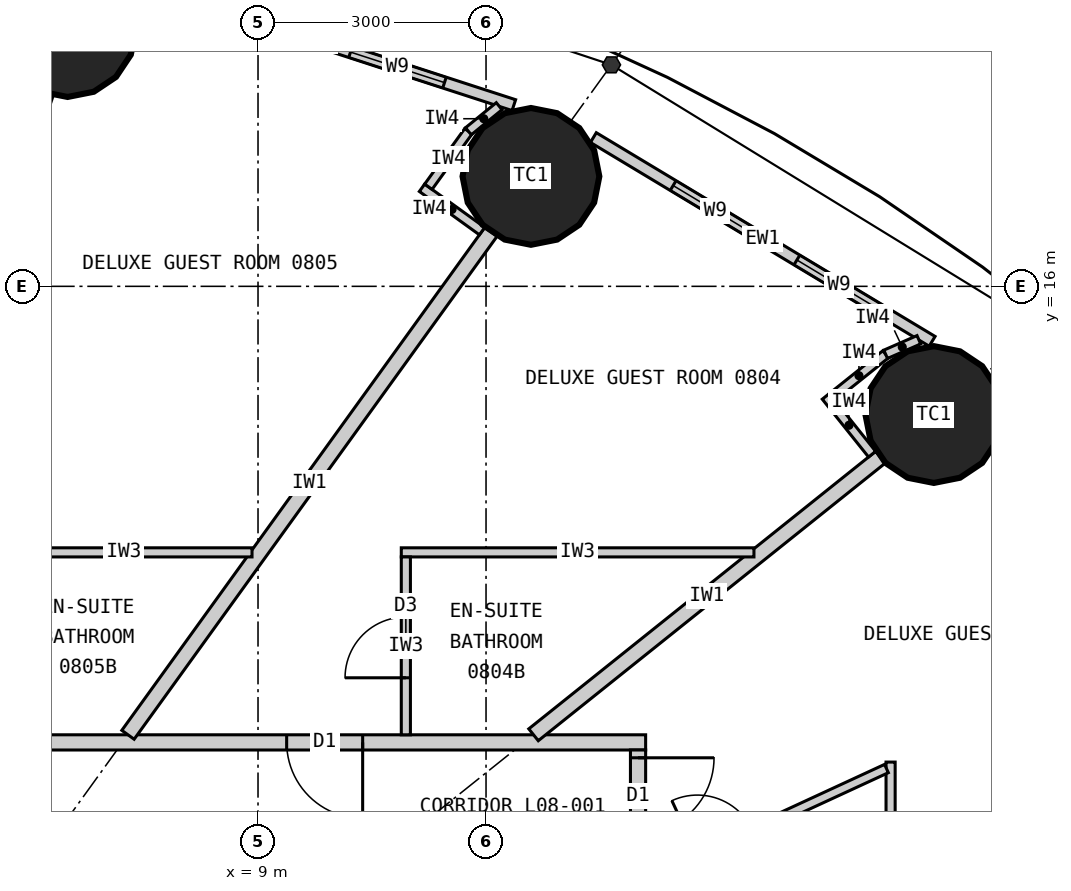
"""IFC4 building model, lengths in metres.
Left out: names, types, materials, properties, quantities, classifications, styles, units other than length and angle.
Written with IfcOpenShell. Run it as: python <this file> out.ifc"""

import sys

from ifc_helpers import new_model, si_unit, direction, frame, frame_2d, origin, origin_2d, place, context, subcontext, project, spatial, rectangle, circle, extrude, element, fill, save


model = new_model("IFC4")
c1 = context("Model", 3, precision=1e-05, world=origin(), true_north=direction((0.0, 1.0)))
c2 = subcontext(c1, "Body", "Model", "MODEL_VIEW")
j1 = project(units=[si_unit("LENGTHUNIT", "METRE"), si_unit("PLANEANGLEUNIT", "RADIAN")], contexts=[c1])
p1 = place(None, origin())
s1 = spatial("IfcSite", under=j1, at=p1, CompositionType="ELEMENT")
p2 = place(p1, origin())
s2 = spatial("IfcBuilding", under=s1, at=p2, CompositionType="ELEMENT")
p3 = place(p2, frame((0.0, 0.0, 39.3)))
s3 = spatial("IfcBuildingStorey", under=s2, at=p3, CompositionType="ELEMENT", Elevation=39.3)
for number, where, z_axis, x_axis in (
    (1, (17.892, 14.313, 0.0), (0.0, 0.0, 1.0), (1.0, 0.0, 0.0)),
    (2, (12.591, 17.447, 0.0), (0.0, 0.0, 1.0), (1.0, 0.0, 0.0)),
    (3, (6.495, 19.391, 0.0), (0.0, 0.0, 1.0), (1.0, 0.0, 0.0)),
):
    element("IfcColumn", number, at=place(p3, frame(where, z_axis=z_axis, x_axis=x_axis)), inside=s3, PredefinedType="COLUMN", context=c2, shape_type="SweptSolid", body=[
        extrude(circle(Radius=0.9, at=origin_2d()), origin(), (0.0, 0.0, 1.0), 3.3),
    ])
p4 = place(p3, frame((17.869, 15.277, 0.0), z_axis=(0.0, 0.0, 1.0), x_axis=(-0.856958191554, 0.515385931054, 0.0)))
e4 = element("IfcWall", 4, at=p4, inside=s3, PredefinedType="ELEMENTEDWALL", context=c2, shape_type="SweptSolid", body=[
    extrude(rectangle(XDim=5.201, YDim=0.15, at=frame_2d((2.601, 0.0))), origin(), (0.0, 0.0, 1.0), 3.12),
])
p5 = place(p4, frame((0.776, 0.0, 0.9)))
e5 = element("IfcOpeningElement", 5, at=p5, cuts=e4, PredefinedType="OPENING", context=c2, shape_type="SweptSolid", body=[
    extrude(rectangle(XDim=1.3, YDim=1.9, at=frame_2d((0.65, 0.95))), frame((0.0, 0.085, 0.0), z_axis=(0.0, -1.0, 0.0), x_axis=(1.0, 0.0, 0.0)), (0.0, 0.0, 1.0), 0.17),
])
p6 = place(p4, frame((2.676, 0.0, 0.9)))
e6 = element("IfcOpeningElement", 6, at=p6, cuts=e4, PredefinedType="OPENING", context=c2, shape_type="SweptSolid", body=[
    extrude(rectangle(XDim=1.3, YDim=1.9, at=frame_2d((0.65, 0.95))), frame((0.0, 0.085, 0.0), z_axis=(0.0, -1.0, 0.0), x_axis=(1.0, 0.0, 0.0)), (0.0, 0.0, 1.0), 0.17),
])
p7 = place(p3, frame((12.366, 18.384, 0.0), z_axis=(0.0, 0.0, 1.0), x_axis=(-0.951138486029, 0.308764603532, 0.0)))
e7 = element("IfcWall", 7, at=p7, inside=s3, PredefinedType="ELEMENTEDWALL", context=c2, shape_type="SweptSolid", body=[
    extrude(rectangle(XDim=5.444, YDim=0.15, at=frame_2d((2.722, 0.0))), origin(), (0.0, 0.0, 1.0), 3.12),
])
p8 = place(p7, frame((0.96, 0.0, 0.9)))
e8 = element("IfcOpeningElement", 8, at=p8, cuts=e7, PredefinedType="OPENING", context=c2, shape_type="SweptSolid", body=[
    extrude(rectangle(XDim=1.3, YDim=1.9, at=frame_2d((0.65, 0.95))), frame((0.0, 0.085, 0.0), z_axis=(0.0, -1.0, 0.0), x_axis=(1.0, 0.0, 0.0)), (0.0, 0.0, 1.0), 0.17),
])
p9 = place(p7, frame((2.86, 0.0, 0.9)))
e9 = element("IfcOpeningElement", 9, at=p9, cuts=e7, PredefinedType="OPENING", context=c2, shape_type="SweptSolid", body=[
    extrude(rectangle(XDim=1.3, YDim=1.9, at=frame_2d((0.65, 0.95))), frame((0.0, 0.085, 0.0), z_axis=(0.0, -1.0, 0.0), x_axis=(1.0, 0.0, 0.0)), (0.0, 0.0, 1.0), 0.17),
])
p10 = place(p3, frame((-14.1, 10.0, 0.0), z_axis=(0.0, 0.0, 1.0), x_axis=(1.0, 0.0, 0.0)))
e10 = element("IfcWall", 10, at=p10, inside=s3, PredefinedType="PARTITIONING", context=c2, shape_type="SweptSolid", body=[
    extrude(rectangle(XDim=28.2, YDim=0.2, at=frame_2d((14.1, 0.0))), origin(), (0.0, 0.0, 1.0), 3.12),
])
p11 = place(p10, frame((23.477, 0.0, 0.0)))
e11 = element("IfcOpeningElement", 11, at=p11, cuts=e10, PredefinedType="OPENING", context=c2, shape_type="SweptSolid", body=[
    extrude(rectangle(XDim=1.0, YDim=2.2, at=frame_2d((0.5, 1.1))), frame((0.0, 0.11, 0.0), z_axis=(0.0, -1.0, 0.0), x_axis=(1.0, 0.0, 0.0)), (0.0, 0.0, 1.0), 0.22),
])
p12 = place(p10, frame((18.529, 0.0, 0.0)))
e12 = element("IfcOpeningElement", 12, at=p12, cuts=e10, PredefinedType="OPENING", context=c2, shape_type="SweptSolid", body=[
    extrude(rectangle(XDim=1.0, YDim=2.2, at=frame_2d((0.5, 1.1))), frame((0.0, 0.11, 0.0), z_axis=(0.0, -1.0, 0.0), x_axis=(1.0, 0.0, 0.0)), (0.0, 0.0, 1.0), 0.22),
])
p13 = place(p10, frame((14.623, 0.0, 0.0)))
e13 = element("IfcOpeningElement", 13, at=p13, cuts=e10, PredefinedType="OPENING", context=c2, shape_type="SweptSolid", body=[
    extrude(rectangle(XDim=1.0, YDim=2.2, at=frame_2d((0.5, 1.1))), frame((0.0, 0.11, 0.0), z_axis=(0.0, -1.0, 0.0), x_axis=(1.0, 0.0, 0.0)), (0.0, 0.0, 1.0), 0.22),
])
p14 = place(p10, frame((11.252, 0.0, 0.0)))
e14 = element("IfcOpeningElement", 14, at=p14, cuts=e10, PredefinedType="OPENING", context=c2, shape_type="SweptSolid", body=[
    extrude(rectangle(XDim=1.0, YDim=2.1, at=frame_2d((0.5, 1.05))), frame((0.0, 0.11, 0.0), z_axis=(0.0, -1.0, 0.0), x_axis=(1.0, 0.0, 0.0)), (0.0, 0.0, 1.0), 0.22),
])
p15 = place(p10, frame((8.671, 0.0, 0.0)))
e15 = element("IfcOpeningElement", 15, at=p15, cuts=e10, PredefinedType="OPENING", context=c2, shape_type="SweptSolid", body=[
    extrude(rectangle(XDim=1.0, YDim=2.2, at=frame_2d((0.5, 1.1))), frame((0.0, 0.11, 0.0), z_axis=(0.0, -1.0, 0.0), x_axis=(1.0, 0.0, 0.0)), (0.0, 0.0, 1.0), 0.22),
])
p16 = place(p10, frame((1.616, 0.0, 0.0)))
e16 = element("IfcOpeningElement", 16, at=p16, cuts=e10, PredefinedType="OPENING", context=c2, shape_type="SweptSolid", body=[
    extrude(rectangle(XDim=1.0, YDim=2.2, at=frame_2d((0.5, 1.1))), frame((0.0, 0.11, 0.0), z_axis=(0.0, -1.0, 0.0), x_axis=(1.0, 0.0, 0.0)), (0.0, 0.0, 1.0), 0.22),
])
p17 = place(p3, frame((14.0, -9.9, 0.0), z_axis=(0.0, 0.0, 1.0), x_axis=(0.0, 1.0, 0.0)))
e17 = element("IfcWall", 17, at=p17, inside=s3, PredefinedType="PARTITIONING", context=c2, shape_type="SweptSolid", body=[
    extrude(rectangle(XDim=19.8, YDim=0.2, at=frame_2d((9.9, 0.0))), origin(), (0.0, 0.0, 1.0), 3.12),
])
p18 = place(p17, frame((11.698, 0.0, 0.0)))
e18 = element("IfcOpeningElement", 18, at=p18, cuts=e17, PredefinedType="OPENING", context=c2, shape_type="SweptSolid", body=[
    extrude(rectangle(XDim=1.0, YDim=2.2, at=frame_2d((0.5, 1.1))), frame((0.0, 0.11, 0.0), z_axis=(0.0, -1.0, 0.0), x_axis=(1.0, 0.0, 0.0)), (0.0, 0.0, 1.0), 0.22),
])
p19 = place(p17, frame((13.554, 0.0, 0.0)))
e19 = element("IfcOpeningElement", 19, at=p19, cuts=e17, PredefinedType="OPENING", context=c2, shape_type="SweptSolid", body=[
    extrude(rectangle(XDim=1.0, YDim=2.0, at=frame_2d((0.5, 1.0))), frame((0.0, 0.11, 0.0), z_axis=(0.0, -1.0, 0.0), x_axis=(1.0, 0.0, 0.0)), (0.0, 0.0, 1.0), 0.22),
])
p20 = place(p17, frame((18.698, 0.0, 0.0)))
e20 = element("IfcOpeningElement", 20, at=p20, cuts=e17, PredefinedType="OPENING", context=c2, shape_type="SweptSolid", body=[
    extrude(rectangle(XDim=1.0, YDim=2.2, at=frame_2d((0.5, 1.1))), frame((0.0, 0.11, 0.0), z_axis=(0.0, -1.0, 0.0), x_axis=(1.0, 0.0, 0.0)), (0.0, 0.0, 1.0), 0.22),
])
p21 = place(p17, frame((0.975, 0.0, 0.0)))
e21 = element("IfcOpeningElement", 21, at=p21, cuts=e17, PredefinedType="OPENING", context=c2, shape_type="SweptSolid", body=[
    extrude(rectangle(XDim=1.0, YDim=2.2, at=frame_2d((0.5, 1.1))), frame((0.0, 0.11, 0.0), z_axis=(0.0, -1.0, 0.0), x_axis=(1.0, 0.0, 0.0)), (0.0, 0.0, 1.0), 0.22),
])
p22 = place(p17, frame((7.097, 0.0, 0.0)))
e22 = element("IfcOpeningElement", 22, at=p22, cuts=e17, PredefinedType="OPENING", context=c2, shape_type="SweptSolid", body=[
    extrude(rectangle(XDim=1.0, YDim=2.2, at=frame_2d((0.5, 1.1))), frame((0.0, 0.11, 0.0), z_axis=(0.0, -1.0, 0.0), x_axis=(1.0, 0.0, 0.0)), (0.0, 0.0, 1.0), 0.22),
])
p23 = place(p3, frame((14.1, 6.512, 0.0), z_axis=(0.0, 0.0, 1.0), x_axis=(0.907842433118, 0.41931147925, 0.0)))
e23 = element("IfcWall", 23, at=p23, inside=s3, PredefinedType="PARTITIONING", context=c2, shape_type="SweptSolid", body=[
    extrude(rectangle(XDim=7.823, YDim=0.2, at=frame_2d((3.912, 0.0))), origin(), (0.0, 0.0, 1.0), 2.32),
])
p24 = place(p3, frame((12.625, 10.1, 0.0), z_axis=(0.0, 0.0, 1.0), x_axis=(0.780872884676, 0.624689953479, 0.0)))
e24 = element("IfcWall", 24, at=p24, inside=s3, PredefinedType="PARTITIONING", context=c2, shape_type="SweptSolid", body=[
    extrude(rectangle(XDim=5.845, YDim=0.2, at=frame_2d((2.922, 0.0))), origin(), (0.0, 0.0, 1.0), 2.32),
])
p25 = place(p3, frame((7.289, 10.1, 0.0), z_axis=(0.0, 0.0, 1.0), x_axis=(0.585216319319, 0.810877216108, 0.0)))
e25 = element("IfcWall", 25, at=p25, inside=s3, PredefinedType="PARTITIONING", context=c2, shape_type="SweptSolid", body=[
    extrude(rectangle(XDim=8.16, YDim=0.2, at=frame_2d((4.08, 0.0))), origin(), (0.0, 0.0, 1.0), 2.32),
])
p26 = place(p3, frame((3.383, 10.1, 0.0), z_axis=(0.0, 0.0, 1.0), x_axis=(0.317593727596, 0.948226884344, 0.0)))
e26 = element("IfcWall", 26, at=p26, inside=s3, PredefinedType="PARTITIONING", context=c2, shape_type="SweptSolid", body=[
    extrude(rectangle(XDim=8.899, YDim=0.2, at=frame_2d((4.449, 0.0))), origin(), (0.0, 0.0, 1.0), 2.32),
])
p27 = place(p3, frame((17.323, 8.101, 0.0), z_axis=(0.0, 0.0, 1.0), x_axis=(0.0, 1.0, 0.0)))
e27 = element("IfcWall", 27, at=p27, inside=s3, PredefinedType="PARTITIONING", context=c2, shape_type="SweptSolid", body=[
    extrude(rectangle(XDim=1.64, YDim=0.12, at=frame_2d((0.82, 0.0))), origin(), (0.0, 0.0, 1.0), 3.12),
])
p28 = place(p3, frame((14.1, 8.193, 0.0), z_axis=(0.0, 0.0, 1.0), x_axis=(0.907836493557, 0.419324338628, 0.0)))
e28 = element("IfcWall", 28, at=p28, inside=s3, PredefinedType="PARTITIONING", context=c2, shape_type="SweptSolid", body=[
    extrude(rectangle(XDim=3.49, YDim=0.12, at=frame_2d((1.745, 0.0))), origin(), (0.0, 0.0, 1.0), 3.12),
])
p29 = place(p28, frame((0.75, 0.0, 0.0)))
e29 = element("IfcOpeningElement", 29, at=p29, cuts=e28, PredefinedType="OPENING", context=c2, shape_type="SweptSolid", body=[
    extrude(rectangle(XDim=0.8, YDim=2.1, at=frame_2d((0.4, 1.05))), frame((0.0, 0.07, 0.0), z_axis=(0.0, -1.0, 0.0), x_axis=(1.0, 0.0, 0.0)), (0.0, 0.0, 1.0), 0.14),
])
p30 = place(p3, frame((15.525, 12.5, 0.0), z_axis=(0.0, 0.0, 1.0), x_axis=(-1.0, 0.0, 0.0)))
e30 = element("IfcWall", 30, at=p30, inside=s3, PredefinedType="PARTITIONING", context=c2, shape_type="SweptSolid", body=[
    extrude(rectangle(XDim=4.64, YDim=0.12, at=frame_2d((2.32, 0.0))), origin(), (0.0, 0.0, 1.0), 3.12),
])
p31 = place(p3, frame((10.945, 10.1, 0.0), z_axis=(0.0, 0.0, 1.0), x_axis=(0.0, 1.0, 0.0)))
e31 = element("IfcWall", 31, at=p31, inside=s3, PredefinedType="PARTITIONING", context=c2, shape_type="SweptSolid", body=[
    extrude(rectangle(XDim=2.34, YDim=0.12, at=frame_2d((1.17, 0.0))), origin(), (0.0, 0.0, 1.0), 3.12),
])
p32 = place(p31, frame((0.75, 0.0, 0.0)))
e32 = element("IfcOpeningElement", 32, at=p32, cuts=e31, PredefinedType="OPENING", context=c2, shape_type="SweptSolid", body=[
    extrude(rectangle(XDim=0.8, YDim=2.1, at=frame_2d((0.4, 1.05))), frame((0.0, 0.07, 0.0), z_axis=(0.0, -1.0, 0.0), x_axis=(1.0, 0.0, 0.0)), (0.0, 0.0, 1.0), 0.14),
])
p33 = place(p3, frame((8.921, 12.5, 0.0), z_axis=(0.0, 0.0, 1.0), x_axis=(-1.0, 0.0, 0.0)))
e33 = element("IfcWall", 33, at=p33, inside=s3, PredefinedType="PARTITIONING", context=c2, shape_type="SweptSolid", body=[
    extrude(rectangle(XDim=3.372, YDim=0.12, at=frame_2d((1.686, 0.0))), origin(), (0.0, 0.0, 1.0), 3.12),
])
p34 = place(p3, frame((17.08, 13.792, 0.0), z_axis=(0.0, 0.0, 1.0), x_axis=(-0.624756144097, 0.780819928289, 0.0)))
e34 = element("IfcWall", 34, at=p34, inside=s3, PredefinedType="PARTITIONING", context=c2, shape_type="SweptSolid", body=[
    extrude(rectangle(XDim=0.975, YDim=0.12, at=frame_2d((0.487, 0.0))), origin(), (0.0, 0.0, 1.0), 3.12),
])
p35 = place(p3, frame((16.555, 14.543, 0.0), z_axis=(0.0, 0.0, 1.0), x_axis=(0.780789399477, 0.62479429708, 0.0)))
e35 = element("IfcWall", 35, at=p35, inside=s3, PredefinedType="PARTITIONING", context=c2, shape_type="SweptSolid", body=[
    extrude(rectangle(XDim=0.9, YDim=0.12, at=frame_2d((0.45, 0.0))), origin(), (0.0, 0.0, 1.0), 3.12),
])
p36 = place(p3, frame((17.258, 15.106, 0.0), z_axis=(0.0, 0.0, 1.0), x_axis=(0.916098562583, 0.400953143937, 0.0)))
e36 = element("IfcWall", 36, at=p36, inside=s3, PredefinedType="PARTITIONING", context=c2, shape_type="SweptSolid", body=[
    extrude(rectangle(XDim=0.477, YDim=0.12, at=frame_2d((0.238, 0.0))), origin(), (0.0, 0.0, 1.0), 3.12),
])
p37 = place(p3, frame((11.948, 16.727, 0.0), z_axis=(0.0, 0.0, 1.0), x_axis=(-0.810897160646, 0.585188683123, 0.0)))
e37 = element("IfcWall", 37, at=p37, inside=s3, PredefinedType="PARTITIONING", context=c2, shape_type="SweptSolid", body=[
    extrude(rectangle(XDim=0.975, YDim=0.12, at=frame_2d((0.487, 0.0))), origin(), (0.0, 0.0, 1.0), 3.12),
])
p38 = place(p3, frame((11.241, 17.31, 0.0), z_axis=(0.0, 0.0, 1.0), x_axis=(0.585054732094, 0.810993810367, 0.0)))
e38 = element("IfcWall", 38, at=p38, inside=s3, PredefinedType="PARTITIONING", context=c2, shape_type="SweptSolid", body=[
    extrude(rectangle(XDim=0.9, YDim=0.12, at=frame_2d((0.45, 0.0))), origin(), (0.0, 0.0, 1.0), 3.12),
])
p39 = place(p3, frame((11.768, 18.04, 0.0), z_axis=(0.0, 0.0, 1.0), x_axis=(0.775268927517, 0.631631292787, 0.0)))
e39 = element("IfcWall", 39, at=p39, inside=s3, PredefinedType="PARTITIONING", context=c2, shape_type="SweptSolid", body=[
    extrude(rectangle(XDim=0.522, YDim=0.12, at=frame_2d((0.261, 0.0))), origin(), (0.0, 0.0, 1.0), 3.12),
])
p40 = place(p5, origin())
e40 = element("IfcWindow", 40, at=p40, inside=s3, PartitioningType="SINGLE_PANEL", PredefinedType="WINDOW", context=c2, shape_type="SweptSolid", body=[
    extrude(rectangle(XDim=1.3, YDim=1.9, at=frame_2d((0.65, 0.95))), frame((0.0, 0.03, 0.0), z_axis=(0.0, -1.0, 0.0), x_axis=(1.0, 0.0, 0.0)), (0.0, 0.0, 1.0), 0.06),
])
fill(e5, e40)
p41 = place(p6, origin())
e41 = element("IfcWindow", 41, at=p41, inside=s3, PartitioningType="SINGLE_PANEL", PredefinedType="WINDOW", context=c2, shape_type="SweptSolid", body=[
    extrude(rectangle(XDim=1.3, YDim=1.9, at=frame_2d((0.65, 0.95))), frame((0.0, 0.03, 0.0), z_axis=(0.0, -1.0, 0.0), x_axis=(1.0, 0.0, 0.0)), (0.0, 0.0, 1.0), 0.06),
])
fill(e6, e41)
p42 = place(p8, origin())
e42 = element("IfcWindow", 42, at=p42, inside=s3, PartitioningType="SINGLE_PANEL", PredefinedType="WINDOW", context=c2, shape_type="SweptSolid", body=[
    extrude(rectangle(XDim=1.3, YDim=1.9, at=frame_2d((0.65, 0.95))), frame((0.0, 0.03, 0.0), z_axis=(0.0, -1.0, 0.0), x_axis=(1.0, 0.0, 0.0)), (0.0, 0.0, 1.0), 0.06),
])
fill(e8, e42)
p43 = place(p20, origin())
e43 = element("IfcDoor", 43, at=p43, inside=s3, OperationType="SINGLE_SWING_RIGHT", PredefinedType="DOOR", context=c2, shape_type="SweptSolid", body=[
    extrude(rectangle(XDim=1.0, YDim=2.2, at=frame_2d((0.5, 1.1))), frame((0.0, 0.025, 0.0), z_axis=(0.0, -1.0, 0.0), x_axis=(1.0, 0.0, 0.0)), (0.0, 0.0, 1.0), 0.05),
])
fill(e20, e43)
p44 = place(p32, origin())
e44 = element("IfcDoor", 44, at=p44, inside=s3, OperationType="SINGLE_SWING_LEFT", PredefinedType="DOOR", context=c2, shape_type="SweptSolid", body=[
    extrude(rectangle(XDim=0.8, YDim=2.1, at=frame_2d((0.4, 1.05))), frame((0.0, 0.025, 0.0), z_axis=(0.0, -1.0, 0.0), x_axis=(1.0, 0.0, 0.0)), (0.0, 0.0, 1.0), 0.05),
])
fill(e32, e44)
p45 = place(p11, origin())
e45 = element("IfcDoor", 45, at=p45, inside=s3, OperationType="SINGLE_SWING_RIGHT", PredefinedType="DOOR", context=c2, shape_type="SweptSolid", body=[
    extrude(rectangle(XDim=1.0, YDim=2.2, at=frame_2d((0.5, 1.1))), frame((0.0, 0.025, 0.0), z_axis=(0.0, -1.0, 0.0), x_axis=(1.0, 0.0, 0.0)), (0.0, 0.0, 1.0), 0.05),
])
fill(e11, e45)
save(model, sys.argv[1])
